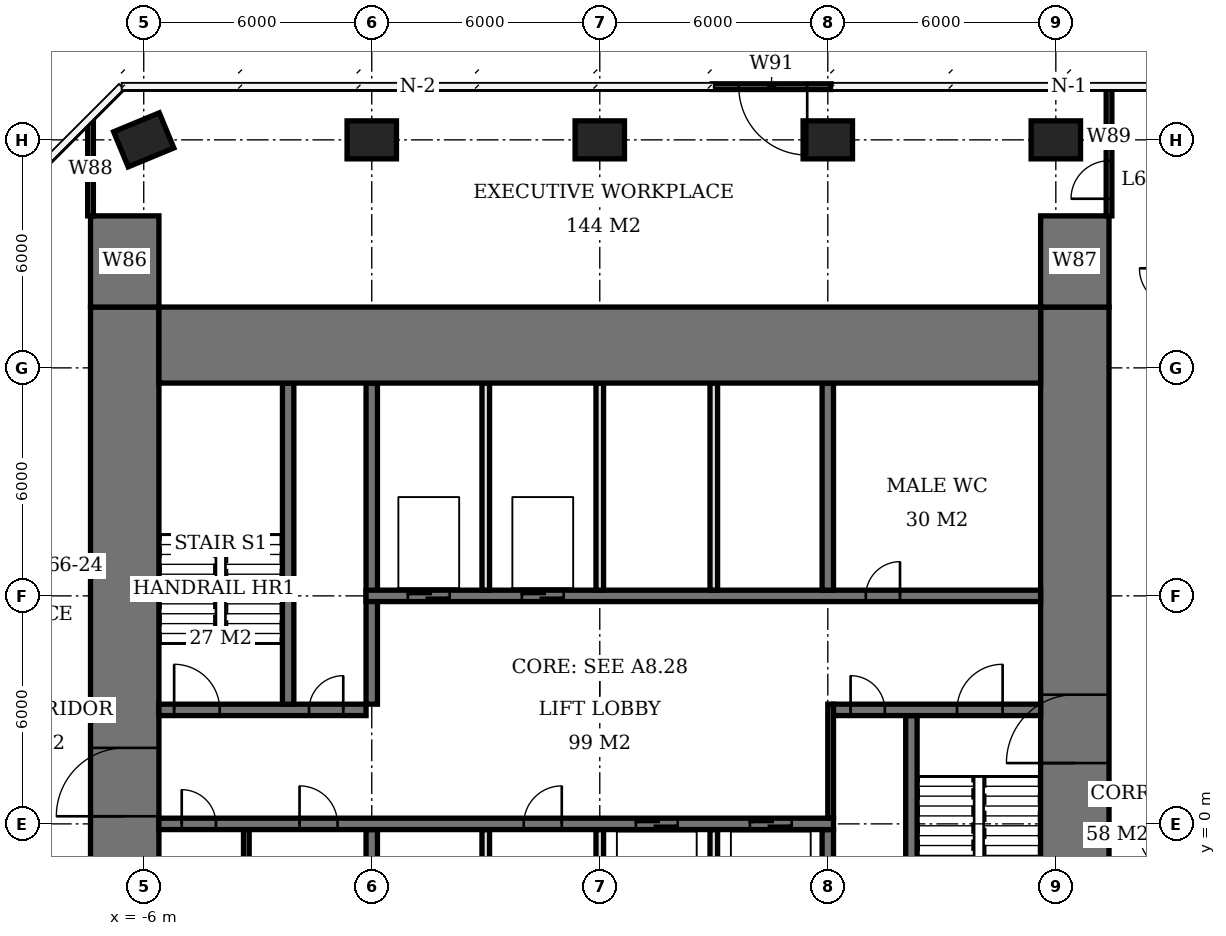
"""IFC4 building model, lengths in metres.
Left out: names, types, materials, properties, quantities, classifications, styles, units other than length and angle.
Written with IfcOpenShell. Run it as: python <this file> out.ifc"""

import sys

from ifc_helpers import new_model, si_unit, direction, frame, frame_2d, origin, origin_2d, place, context, subcontext, project, spatial, rectangle, extrude, element, fill, save


model = new_model("IFC4")
c1 = context("Model", 3, precision=1e-05, world=origin(), true_north=direction((0.0, 1.0)))
c2 = subcontext(c1, "Body", "Model", "MODEL_VIEW")
j1 = project(units=[si_unit("LENGTHUNIT", "METRE"), si_unit("PLANEANGLEUNIT", "RADIAN")], contexts=[c1])
p1 = place(None, origin())
s1 = spatial("IfcSite", under=j1, at=p1, CompositionType="ELEMENT")
p2 = place(p1, origin())
s2 = spatial("IfcBuilding", under=s1, at=p2, CompositionType="ELEMENT")
p3 = place(p2, frame((0.0, 0.0, 268.4)))
s3 = spatial("IfcBuildingStorey", under=s2, at=p3, CompositionType="ELEMENT", Elevation=268.4)
for number, where, z_axis, x_axis in (
    (1, (-6.0, 18.0, 0.0), (0.0, 0.0, 1.0), (0.924, 0.383, 0.0)),
    (2, (0.0, 18.0, 0.0), (0.0, 0.0, 1.0), (1.0, 0.0, 0.0)),
    (3, (6.0, 18.0, 0.0), (0.0, 0.0, 1.0), (1.0, 0.0, 0.0)),
    (4, (12.0, 18.0, 0.0), (0.0, 0.0, 1.0), (1.0, 0.0, 0.0)),
    (5, (18.0, 18.0, 0.0), (0.0, 0.0, 1.0), (1.0, 0.0, 0.0)),
):
    element("IfcColumn", number, at=place(p3, frame(where, z_axis=z_axis, x_axis=x_axis)), inside=s3, PredefinedType="COLUMN", context=c2, shape_type="SweptSolid", body=[
        extrude(rectangle(XDim=1.3, YDim=1.0, at=origin_2d()), origin(), (0.0, 0.0, 1.0), 3.9),
    ])
p4 = place(p3, frame((-5.6, 12.6, 0.0), z_axis=(0.0, 0.0, 1.0), x_axis=(1.0, 0.0, 0.0)))
e6 = element("IfcWall", 6, at=p4, inside=s3, PredefinedType="SHEAR", context=c2, shape_type="SweptSolid", body=[
    extrude(rectangle(XDim=23.2, YDim=2.0, at=frame_2d((11.6, 0.0))), origin(), (0.0, 0.0, 1.0), 3.9),
])
p5 = place(p3, frame((-6.5, -7.6, 0.0), z_axis=(0.0, 0.0, 1.0), x_axis=(0.0, 1.0, 0.0)))
e7 = element("IfcWall", 7, at=p5, inside=s3, PredefinedType="SHEAR", context=c2, shape_type="SweptSolid", body=[
    extrude(rectangle(XDim=21.2, YDim=1.8, at=frame_2d((10.6, 0.0))), origin(), (0.0, 0.0, 1.0), 3.9),
])
p6 = place(p5, frame((7.8, 0.0, 0.0)))
e8 = element("IfcOpeningElement", 8, at=p6, cuts=e7, PredefinedType="OPENING", context=c2, shape_type="SweptSolid", body=[
    extrude(rectangle(XDim=1.8, YDim=2.4, at=frame_2d((0.9, 1.2))), frame((0.0, 0.91, 0.0), z_axis=(0.0, -1.0, 0.0), x_axis=(1.0, 0.0, 0.0)), (0.0, 0.0, 1.0), 1.82),
])
p7 = place(p3, frame((18.5, -7.6, 0.0), z_axis=(0.0, 0.0, 1.0), x_axis=(0.0, 1.0, 0.0)))
e9 = element("IfcWall", 9, at=p7, inside=s3, PredefinedType="SHEAR", context=c2, shape_type="SweptSolid", body=[
    extrude(rectangle(XDim=21.2, YDim=1.8, at=frame_2d((10.6, 0.0))), origin(), (0.0, 0.0, 1.0), 3.9),
])
p8 = place(p7, frame((9.2, 0.0, 0.0)))
e10 = element("IfcOpeningElement", 10, at=p8, cuts=e9, PredefinedType="OPENING", context=c2, shape_type="SweptSolid", body=[
    extrude(rectangle(XDim=1.8, YDim=2.4, at=frame_2d((0.9, 1.2))), frame((0.0, 0.91, 0.0), z_axis=(0.0, -1.0, 0.0), x_axis=(1.0, 0.0, 0.0)), (0.0, 0.0, 1.0), 1.82),
])
for number, where, z_axis, x_axis in (
    (11, (-6.5, 13.6, 0.0), (0.0, 0.0, 1.0), (0.0, 1.0, 0.0)),
    (12, (18.5, 13.6, 0.0), (0.0, 0.0, 1.0), (0.0, 1.0, 0.0)),
):
    element("IfcWall", number, at=place(p3, frame(where, z_axis=z_axis, x_axis=x_axis)), inside=s3, PredefinedType="SHEAR", context=c2, shape_type="SweptSolid", body=[
        extrude(rectangle(XDim=2.4, YDim=1.8, at=frame_2d((1.2, 0.0))), origin(), (0.0, 0.0, 1.0), 3.9),
    ])
p9 = place(p3, frame((-5.6, 0.0, 0.0), z_axis=(0.0, 0.0, 1.0), x_axis=(1.0, 0.0, 0.0)))
e13 = element("IfcWall", 13, at=p9, inside=s3, PredefinedType="SHEAR", context=c2, shape_type="SweptSolid", body=[
    extrude(rectangle(XDim=17.75, YDim=0.3, at=frame_2d((8.875, 0.0))), origin(), (0.0, 0.0, 1.0), 3.9),
])
p10 = place(p9, frame((0.6, 0.0, 0.0)))
e14 = element("IfcOpeningElement", 14, at=p10, cuts=e13, PredefinedType="OPENING", context=c2, shape_type="SweptSolid", body=[
    extrude(rectangle(XDim=0.9, YDim=2.1, at=frame_2d((0.45, 1.05))), frame((0.0, 0.16, 0.0), z_axis=(0.0, -1.0, 0.0), x_axis=(1.0, 0.0, 0.0)), (0.0, 0.0, 1.0), 0.32),
])
p11 = place(p9, frame((3.7, 0.0, 0.0)))
e15 = element("IfcOpeningElement", 15, at=p11, cuts=e13, PredefinedType="OPENING", context=c2, shape_type="SweptSolid", body=[
    extrude(rectangle(XDim=1.0, YDim=2.1, at=frame_2d((0.5, 1.05))), frame((0.0, 0.16, 0.0), z_axis=(0.0, -1.0, 0.0), x_axis=(1.0, 0.0, 0.0)), (0.0, 0.0, 1.0), 0.32),
])
p12 = place(p9, frame((9.6, 0.0, 0.0)))
e16 = element("IfcOpeningElement", 16, at=p12, cuts=e13, PredefinedType="OPENING", context=c2, shape_type="SweptSolid", body=[
    extrude(rectangle(XDim=1.0, YDim=2.1, at=frame_2d((0.5, 1.05))), frame((0.0, 0.16, 0.0), z_axis=(0.0, -1.0, 0.0), x_axis=(1.0, 0.0, 0.0)), (0.0, 0.0, 1.0), 0.32),
])
p13 = place(p9, frame((12.55, 0.0, 0.0)))
e17 = element("IfcOpeningElement", 17, at=p13, cuts=e13, PredefinedType="OPENING", context=c2, shape_type="SweptSolid", body=[
    extrude(rectangle(XDim=1.1, YDim=2.1, at=frame_2d((0.55, 1.05))), frame((0.0, 0.16, 0.0), z_axis=(0.0, -1.0, 0.0), x_axis=(1.0, 0.0, 0.0)), (0.0, 0.0, 1.0), 0.32),
])
p14 = place(p9, frame((15.55, 0.0, 0.0)))
e18 = element("IfcOpeningElement", 18, at=p14, cuts=e13, PredefinedType="OPENING", context=c2, shape_type="SweptSolid", body=[
    extrude(rectangle(XDim=1.1, YDim=2.1, at=frame_2d((0.55, 1.05))), frame((0.0, 0.16, 0.0), z_axis=(0.0, -1.0, 0.0), x_axis=(1.0, 0.0, 0.0)), (0.0, 0.0, 1.0), 0.32),
])
p15 = place(p3, frame((-5.6, 3.0, 0.0), z_axis=(0.0, 0.0, 1.0), x_axis=(1.0, 0.0, 0.0)))
e19 = element("IfcWall", 19, at=p15, inside=s3, PredefinedType="SHEAR", context=c2, shape_type="SweptSolid", body=[
    extrude(rectangle(XDim=5.45, YDim=0.3, at=frame_2d((2.725, 0.0))), origin(), (0.0, 0.0, 1.0), 3.9),
])
p16 = place(p15, frame((0.4, 0.0, 0.0)))
e20 = element("IfcOpeningElement", 20, at=p16, cuts=e19, PredefinedType="OPENING", context=c2, shape_type="SweptSolid", body=[
    extrude(rectangle(XDim=1.2, YDim=2.1, at=frame_2d((0.6, 1.05))), frame((0.0, 0.16, 0.0), z_axis=(0.0, -1.0, 0.0), x_axis=(1.0, 0.0, 0.0)), (0.0, 0.0, 1.0), 0.32),
])
p17 = place(p15, frame((3.95, 0.0, 0.0)))
e21 = element("IfcOpeningElement", 21, at=p17, cuts=e19, PredefinedType="OPENING", context=c2, shape_type="SweptSolid", body=[
    extrude(rectangle(XDim=0.9, YDim=2.1, at=frame_2d((0.45, 1.05))), frame((0.0, 0.16, 0.0), z_axis=(0.0, -1.0, 0.0), x_axis=(1.0, 0.0, 0.0)), (0.0, 0.0, 1.0), 0.32),
])
p18 = place(p3, frame((12.15, 3.0, 0.0), z_axis=(0.0, 0.0, 1.0), x_axis=(1.0, 0.0, 0.0)))
e22 = element("IfcWall", 22, at=p18, inside=s3, PredefinedType="SHEAR", context=c2, shape_type="SweptSolid", body=[
    extrude(rectangle(XDim=5.45, YDim=0.3, at=frame_2d((2.725, 0.0))), origin(), (0.0, 0.0, 1.0), 3.9),
])
p19 = place(p18, frame((3.25, 0.0, 0.0)))
e23 = element("IfcOpeningElement", 23, at=p19, cuts=e22, PredefinedType="OPENING", context=c2, shape_type="SweptSolid", body=[
    extrude(rectangle(XDim=1.2, YDim=2.1, at=frame_2d((0.6, 1.05))), frame((0.0, 0.16, 0.0), z_axis=(0.0, -1.0, 0.0), x_axis=(1.0, 0.0, 0.0)), (0.0, 0.0, 1.0), 0.32),
])
p20 = place(p18, frame((0.45, 0.0, 0.0)))
e24 = element("IfcOpeningElement", 24, at=p20, cuts=e22, PredefinedType="OPENING", context=c2, shape_type="SweptSolid", body=[
    extrude(rectangle(XDim=0.9, YDim=2.1, at=frame_2d((0.45, 1.05))), frame((0.0, 0.16, 0.0), z_axis=(0.0, -1.0, 0.0), x_axis=(1.0, 0.0, 0.0)), (0.0, 0.0, 1.0), 0.32),
])
p21 = place(p3, frame((-0.15, 6.0, 0.0), z_axis=(0.0, 0.0, 1.0), x_axis=(1.0, 0.0, 0.0)))
e25 = element("IfcWall", 25, at=p21, inside=s3, PredefinedType="SHEAR", context=c2, shape_type="SweptSolid", body=[
    extrude(rectangle(XDim=17.75, YDim=0.3, at=frame_2d((8.875, 0.0))), origin(), (0.0, 0.0, 1.0), 3.9),
])
p22 = place(p21, frame((13.15, 0.0, 0.0)))
e26 = element("IfcOpeningElement", 26, at=p22, cuts=e25, PredefinedType="OPENING", context=c2, shape_type="SweptSolid", body=[
    extrude(rectangle(XDim=0.9, YDim=2.1, at=frame_2d((0.45, 1.05))), frame((0.0, 0.16, 0.0), z_axis=(0.0, -1.0, 0.0), x_axis=(1.0, 0.0, 0.0)), (0.0, 0.0, 1.0), 0.32),
])
p23 = place(p21, frame((1.1, 0.0, 0.0)))
e27 = element("IfcOpeningElement", 27, at=p23, cuts=e25, PredefinedType="OPENING", context=c2, shape_type="SweptSolid", body=[
    extrude(rectangle(XDim=1.1, YDim=2.1, at=frame_2d((0.55, 1.05))), frame((0.0, 0.16, 0.0), z_axis=(0.0, -1.0, 0.0), x_axis=(1.0, 0.0, 0.0)), (0.0, 0.0, 1.0), 0.32),
])
p24 = place(p21, frame((4.1, 0.0, 0.0)))
e28 = element("IfcOpeningElement", 28, at=p24, cuts=e25, PredefinedType="OPENING", context=c2, shape_type="SweptSolid", body=[
    extrude(rectangle(XDim=1.1, YDim=2.1, at=frame_2d((0.55, 1.05))), frame((0.0, 0.16, 0.0), z_axis=(0.0, -1.0, 0.0), x_axis=(1.0, 0.0, 0.0)), (0.0, 0.0, 1.0), 0.32),
])
p25 = place(p3, frame((0.0, -5.6, 0.0), z_axis=(0.0, 0.0, 1.0), x_axis=(0.0, 1.0, 0.0)))
e29 = element("IfcWall", 29, at=p25, inside=s3, PredefinedType="SHEAR", context=c2, shape_type="SweptSolid", body=[
    extrude(rectangle(XDim=5.45, YDim=0.3, at=frame_2d((2.725, 0.0))), origin(), (0.0, 0.0, 1.0), 3.9),
])
p26 = place(p3, frame((0.0, 3.15, 0.0), z_axis=(0.0, 0.0, 1.0), x_axis=(0.0, 1.0, 0.0)))
e30 = element("IfcWall", 30, at=p26, inside=s3, PredefinedType="SHEAR", context=c2, shape_type="SweptSolid", body=[
    extrude(rectangle(XDim=8.45, YDim=0.3, at=frame_2d((4.225, 0.0))), origin(), (0.0, 0.0, 1.0), 3.9),
])
for number, where, z_axis, x_axis in (
    (31, (12.0, -5.6, 0.0), (0.0, 0.0, 1.0), (0.0, 1.0, 0.0)),
    (32, (12.0, 6.15, 0.0), (0.0, 0.0, 1.0), (0.0, 1.0, 0.0)),
):
    element("IfcWall", number, at=place(p3, frame(where, z_axis=z_axis, x_axis=x_axis)), inside=s3, PredefinedType="SHEAR", context=c2, shape_type="SweptSolid", body=[
        extrude(rectangle(XDim=5.45, YDim=0.3, at=frame_2d((2.725, 0.0))), origin(), (0.0, 0.0, 1.0), 3.9),
    ])
for number, where, z_axis, x_axis in (
    (33, (-2.2, 3.15, 0.0), (0.0, 0.0, 1.0), (0.0, 1.0, 0.0)),
    (34, (14.2, -5.6, 0.0), (0.0, 0.0, 1.0), (0.0, 1.0, 0.0)),
):
    element("IfcWall", number, at=place(p3, frame(where, z_axis=z_axis, x_axis=x_axis)), inside=s3, PredefinedType="SHEAR", context=c2, shape_type="SweptSolid", body=[
        extrude(rectangle(XDim=8.45, YDim=0.3, at=frame_2d((4.225, 0.0))), origin(), (0.0, 0.0, 1.0), 3.9),
    ])
for number, where, z_axis, x_axis in (
    (35, (3.0, 6.15, 0.0), (0.0, 0.0, 1.0), (0.0, 1.0, 0.0)),
    (36, (6.0, 6.15, 0.0), (0.0, 0.0, 1.0), (0.0, 1.0, 0.0)),
    (37, (9.0, 6.15, 0.0), (0.0, 0.0, 1.0), (0.0, 1.0, 0.0)),
    (38, (3.0, -5.6, 0.0), (0.0, 0.0, 1.0), (0.0, 1.0, 0.0)),
    (39, (6.0, -5.6, 0.0), (0.0, 0.0, 1.0), (0.0, 1.0, 0.0)),
    (40, (9.0, -5.6, 0.0), (0.0, 0.0, 1.0), (0.0, 1.0, 0.0)),
):
    element("IfcWall", number, at=place(p3, frame(where, z_axis=z_axis, x_axis=x_axis)), inside=s3, PredefinedType="SOLIDWALL", context=c2, shape_type="SweptSolid", body=[
        extrude(rectangle(XDim=5.45, YDim=0.2, at=frame_2d((2.725, 0.0))), origin(), (0.0, 0.0, 1.0), 3.9),
    ])
p27 = place(p3, frame((12.083, 19.4, 0.0), z_axis=(0.0, 0.0, 1.0), x_axis=(-1.0, 0.0, 0.0)))
e41 = element("IfcWall", 41, at=p27, inside=s3, PredefinedType="USERDEFINED", context=c2, shape_type="SweptSolid", body=[
    extrude(rectangle(XDim=3.126, YDim=0.15, at=frame_2d((1.563, 0.0))), origin(), (0.0, 0.0, 1.0), 3.9),
])
p28 = place(p27, frame((0.625, 0.0, 0.0)))
e42 = element("IfcOpeningElement", 42, at=p28, cuts=e41, PredefinedType="OPENING", context=c2, shape_type="SweptSolid", body=[
    extrude(rectangle(XDim=1.8, YDim=2.4, at=frame_2d((0.9, 1.2))), frame((0.0, 0.085, 0.0), z_axis=(0.0, -1.0, 0.0), x_axis=(1.0, 0.0, 0.0)), (0.0, 0.0, 1.0), 0.17),
])
p29 = place(p3, frame((-10.923, 18.37, 0.0), z_axis=(0.0, 0.0, 1.0), x_axis=(0.707106781187, 0.707106781187, 0.0)))
e43 = element("IfcWall", 43, at=p29, inside=s3, PredefinedType="USERDEFINED", context=c2, shape_type="SweptSolid", body=[
    extrude(rectangle(XDim=6.438, YDim=0.3, at=frame_2d((3.219, 0.0))), origin(), (0.0, 0.0, 1.0), 0.6),
])
p30 = place(p3, frame((-3.3, -5.6, 0.0), z_axis=(0.0, 0.0, 1.0), x_axis=(0.0, 1.0, 0.0)))
e44 = element("IfcWall", 44, at=p30, inside=s3, PredefinedType="PLUMBINGWALL", context=c2, shape_type="SweptSolid", body=[
    extrude(rectangle(XDim=5.45, YDim=0.15, at=frame_2d((2.725, 0.0))), origin(), (0.0, 0.0, 1.0), 3.65),
])
p31 = place(p3, frame((-7.4, 16.0, 0.0), z_axis=(0.0, 0.0, 1.0), x_axis=(0.0, 1.0, 0.0)))
e45 = element("IfcWall", 45, at=p31, inside=s3, PredefinedType="PARTITIONING", context=c2, shape_type="SweptSolid", body=[
    extrude(rectangle(XDim=2.464, YDim=0.15, at=frame_2d((1.232, 0.0))), origin(), (0.0, 0.0, 1.0), 3.65),
])
p32 = place(p3, frame((19.4, 16.0, 0.0), z_axis=(0.0, 0.0, 1.0), x_axis=(0.0, 1.0, 0.0)))
e46 = element("IfcWall", 46, at=p32, inside=s3, PredefinedType="PARTITIONING", context=c2, shape_type="SweptSolid", body=[
    extrude(rectangle(XDim=3.375, YDim=0.15, at=frame_2d((1.688, 0.0))), origin(), (0.0, 0.0, 1.0), 3.65),
])
p33 = place(p32, frame((0.45, 0.0, 0.0)))
e47 = element("IfcOpeningElement", 47, at=p33, cuts=e46, PredefinedType="OPENING", context=c2, shape_type="SweptSolid", body=[
    extrude(rectangle(XDim=1.0, YDim=2.1, at=frame_2d((0.5, 1.05))), frame((0.0, 0.085, 0.0), z_axis=(0.0, -1.0, 0.0), x_axis=(1.0, 0.0, 0.0)), (0.0, 0.0, 1.0), 0.17),
])
p34 = place(p3, frame((12.075, 0.15, 0.0), z_axis=(0.0, 0.0, 1.0), x_axis=(0.0, 1.0, 0.0)))
e48 = element("IfcWall", 48, at=p34, inside=s3, PredefinedType="PARTITIONING", context=c2, shape_type="SweptSolid", body=[
    extrude(rectangle(XDim=3.0, YDim=0.15, at=frame_2d((1.5, 0.0))), origin(), (0.0, 0.0, 1.0), 3.65),
])
p35 = place(p28, origin())
e49 = element("IfcDoor", 49, at=p35, inside=s3, OperationType="DOUBLE_DOOR_SINGLE_SWING", PredefinedType="DOOR", context=c2, shape_type="SweptSolid", body=[
    extrude(rectangle(XDim=1.8, YDim=2.4, at=frame_2d((0.9, 1.2))), frame((0.0, 0.025, 0.0), z_axis=(0.0, -1.0, 0.0), x_axis=(1.0, 0.0, 0.0)), (0.0, 0.0, 1.0), 0.05),
])
fill(e42, e49)
p36 = place(p6, origin())
e50 = element("IfcDoor", 50, at=p36, inside=s3, OperationType="DOUBLE_DOOR_SINGLE_SWING", PredefinedType="DOOR", context=c2, shape_type="SweptSolid", body=[
    extrude(rectangle(XDim=1.8, YDim=2.4, at=frame_2d((0.9, 1.2))), frame((0.0, 0.025, 0.0), z_axis=(0.0, -1.0, 0.0), x_axis=(1.0, 0.0, 0.0)), (0.0, 0.0, 1.0), 0.05),
])
fill(e8, e50)
p37 = place(p8, origin())
e51 = element("IfcDoor", 51, at=p37, inside=s3, OperationType="DOUBLE_DOOR_SINGLE_SWING", PredefinedType="DOOR", context=c2, shape_type="SweptSolid", body=[
    extrude(rectangle(XDim=1.8, YDim=2.4, at=frame_2d((0.9, 1.2))), frame((0.0, 0.025, 0.0), z_axis=(0.0, -1.0, 0.0), x_axis=(1.0, 0.0, 0.0)), (0.0, 0.0, 1.0), 0.05),
])
fill(e10, e51)
p38 = place(p16, origin())
e52 = element("IfcDoor", 52, at=p38, inside=s3, OperationType="SINGLE_SWING_LEFT", PredefinedType="DOOR", context=c2, shape_type="SweptSolid", body=[
    extrude(rectangle(XDim=1.2, YDim=2.1, at=frame_2d((0.6, 1.05))), frame((0.0, 0.025, 0.0), z_axis=(0.0, -1.0, 0.0), x_axis=(1.0, 0.0, 0.0)), (0.0, 0.0, 1.0), 0.05),
])
fill(e20, e52)
p39 = place(p17, origin())
e53 = element("IfcDoor", 53, at=p39, inside=s3, OperationType="SINGLE_SWING_RIGHT", PredefinedType="DOOR", context=c2, shape_type="SweptSolid", body=[
    extrude(rectangle(XDim=0.9, YDim=2.1, at=frame_2d((0.45, 1.05))), frame((0.0, 0.025, 0.0), z_axis=(0.0, -1.0, 0.0), x_axis=(1.0, 0.0, 0.0)), (0.0, 0.0, 1.0), 0.05),
])
fill(e21, e53)
p40 = place(p19, origin())
e54 = element("IfcDoor", 54, at=p40, inside=s3, OperationType="SINGLE_SWING_RIGHT", PredefinedType="DOOR", context=c2, shape_type="SweptSolid", body=[
    extrude(rectangle(XDim=1.2, YDim=2.1, at=frame_2d((0.6, 1.05))), frame((0.0, 0.025, 0.0), z_axis=(0.0, -1.0, 0.0), x_axis=(1.0, 0.0, 0.0)), (0.0, 0.0, 1.0), 0.05),
])
fill(e23, e54)
p41 = place(p20, origin())
e55 = element("IfcDoor", 55, at=p41, inside=s3, OperationType="SINGLE_SWING_LEFT", PredefinedType="DOOR", context=c2, shape_type="SweptSolid", body=[
    extrude(rectangle(XDim=0.9, YDim=2.1, at=frame_2d((0.45, 1.05))), frame((0.0, 0.025, 0.0), z_axis=(0.0, -1.0, 0.0), x_axis=(1.0, 0.0, 0.0)), (0.0, 0.0, 1.0), 0.05),
])
fill(e24, e55)
p42 = place(p10, origin())
e56 = element("IfcDoor", 56, at=p42, inside=s3, OperationType="SINGLE_SWING_LEFT", PredefinedType="DOOR", context=c2, shape_type="SweptSolid", body=[
    extrude(rectangle(XDim=0.9, YDim=2.1, at=frame_2d((0.45, 1.05))), frame((0.0, 0.025, 0.0), z_axis=(0.0, -1.0, 0.0), x_axis=(1.0, 0.0, 0.0)), (0.0, 0.0, 1.0), 0.05),
])
fill(e14, e56)
p43 = place(p11, origin())
e57 = element("IfcDoor", 57, at=p43, inside=s3, OperationType="SINGLE_SWING_LEFT", PredefinedType="DOOR", context=c2, shape_type="SweptSolid", body=[
    extrude(rectangle(XDim=1.0, YDim=2.1, at=frame_2d((0.5, 1.05))), frame((0.0, 0.025, 0.0), z_axis=(0.0, -1.0, 0.0), x_axis=(1.0, 0.0, 0.0)), (0.0, 0.0, 1.0), 0.05),
])
fill(e15, e57)
p44 = place(p22, origin())
e58 = element("IfcDoor", 58, at=p44, inside=s3, OperationType="SINGLE_SWING_RIGHT", PredefinedType="DOOR", context=c2, shape_type="SweptSolid", body=[
    extrude(rectangle(XDim=0.9, YDim=2.1, at=frame_2d((0.45, 1.05))), frame((0.0, 0.025, 0.0), z_axis=(0.0, -1.0, 0.0), x_axis=(1.0, 0.0, 0.0)), (0.0, 0.0, 1.0), 0.05),
])
fill(e26, e58)
p45 = place(p12, origin())
e59 = element("IfcDoor", 59, at=p45, inside=s3, OperationType="SINGLE_SWING_RIGHT", PredefinedType="DOOR", context=c2, shape_type="SweptSolid", body=[
    extrude(rectangle(XDim=1.0, YDim=2.1, at=frame_2d((0.5, 1.05))), frame((0.0, 0.025, 0.0), z_axis=(0.0, -1.0, 0.0), x_axis=(1.0, 0.0, 0.0)), (0.0, 0.0, 1.0), 0.05),
])
fill(e16, e59)
p46 = place(p23, origin())
e60 = element("IfcDoor", 60, at=p46, inside=s3, OperationType="DOUBLE_DOOR_SLIDING", PredefinedType="USERDEFINED", context=c2, shape_type="SweptSolid", body=[
    extrude(rectangle(XDim=1.1, YDim=2.1, at=frame_2d((0.55, 1.05))), frame((0.0, 0.025, 0.0), z_axis=(0.0, -1.0, 0.0), x_axis=(1.0, 0.0, 0.0)), (0.0, 0.0, 1.0), 0.05),
])
fill(e27, e60)
p47 = place(p24, origin())
e61 = element("IfcDoor", 61, at=p47, inside=s3, OperationType="DOUBLE_DOOR_SLIDING", PredefinedType="USERDEFINED", context=c2, shape_type="SweptSolid", body=[
    extrude(rectangle(XDim=1.1, YDim=2.1, at=frame_2d((0.55, 1.05))), frame((0.0, 0.025, 0.0), z_axis=(0.0, -1.0, 0.0), x_axis=(1.0, 0.0, 0.0)), (0.0, 0.0, 1.0), 0.05),
])
fill(e28, e61)
p48 = place(p13, origin())
e62 = element("IfcDoor", 62, at=p48, inside=s3, OperationType="DOUBLE_DOOR_SLIDING", PredefinedType="USERDEFINED", context=c2, shape_type="SweptSolid", body=[
    extrude(rectangle(XDim=1.1, YDim=2.1, at=frame_2d((0.55, 1.05))), frame((0.0, 0.025, 0.0), z_axis=(0.0, -1.0, 0.0), x_axis=(1.0, 0.0, 0.0)), (0.0, 0.0, 1.0), 0.05),
])
fill(e17, e62)
p49 = place(p14, origin())
e63 = element("IfcDoor", 63, at=p49, inside=s3, OperationType="DOUBLE_DOOR_SLIDING", PredefinedType="USERDEFINED", context=c2, shape_type="SweptSolid", body=[
    extrude(rectangle(XDim=1.1, YDim=2.1, at=frame_2d((0.55, 1.05))), frame((0.0, 0.025, 0.0), z_axis=(0.0, -1.0, 0.0), x_axis=(1.0, 0.0, 0.0)), (0.0, 0.0, 1.0), 0.05),
])
fill(e18, e63)
p50 = place(p33, origin())
e64 = element("IfcDoor", 64, at=p50, inside=s3, OperationType="SINGLE_SWING_LEFT", PredefinedType="DOOR", context=c2, shape_type="SweptSolid", body=[
    extrude(rectangle(XDim=1.0, YDim=2.1, at=frame_2d((0.5, 1.05))), frame((0.0, 0.025, 0.0), z_axis=(0.0, -1.0, 0.0), x_axis=(1.0, 0.0, 0.0)), (0.0, 0.0, 1.0), 0.05),
])
fill(e47, e64)
save(model, sys.argv[1])
